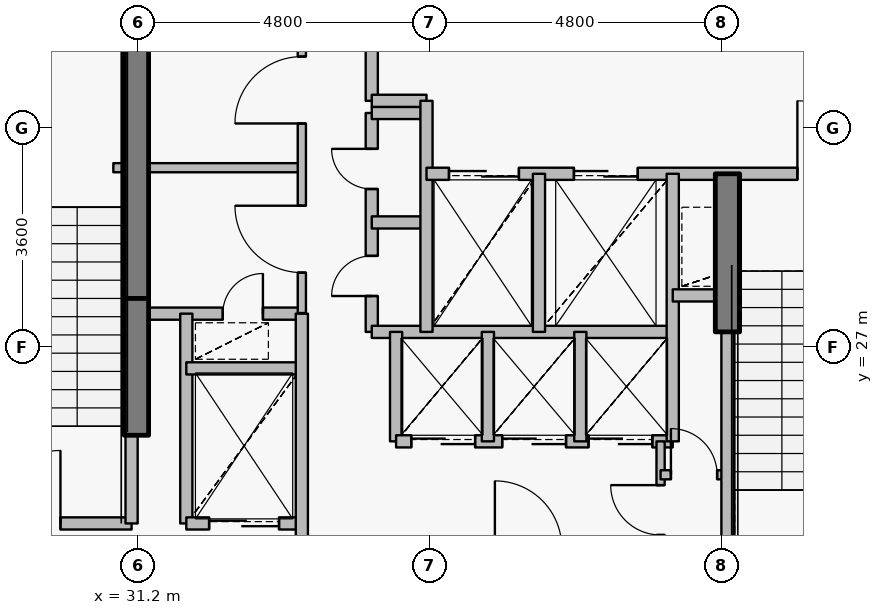
"""IFC4 building model, lengths in metres.
Left out: names, types, materials, properties, quantities, classifications, styles, units other than length and angle.
Written with IfcOpenShell. Run it as: python <this file> out.ifc"""

import sys

from ifc_helpers import new_model, si_unit, direction, frame, frame_2d, origin, origin_2d, place, context, subcontext, project, spatial, rectangle, extrude, source, transform, mapped, element, fill, save


model = new_model("IFC4")
c1 = context("Model", 3, precision=1e-05, world=origin(), true_north=direction((0.0, 1.0)))
c2 = subcontext(c1, "Body", "Model", "MODEL_VIEW")
j1 = project(units=[si_unit("LENGTHUNIT", "METRE"), si_unit("PLANEANGLEUNIT", "RADIAN")], contexts=[c1])
p1 = place(None, origin())
s1 = spatial("IfcSite", under=j1, at=p1, CompositionType="ELEMENT")
p2 = place(p1, origin())
s2 = spatial("IfcBuilding", under=s1, at=p2, CompositionType="ELEMENT")
p3 = place(p2, frame((0.0, 0.0, 335.4)))
s3 = spatial("IfcBuildingStorey", under=s2, at=p3, CompositionType="ELEMENT", Elevation=335.4)
p4 = place(p3, frame((31.18, 27.8, 0.0), z_axis=(0.0, 0.0, 1.0), x_axis=(0.0, 1.0, 0.0)))
e1 = element("IfcWall", 1, at=p4, inside=s3, PredefinedType="SHEAR", context=c2, shape_type="SweptSolid", body=[
    extrude(rectangle(XDim=4.75, YDim=0.4, at=frame_2d((2.375, 0.0))), origin(), (0.0, 0.0, 1.0), 3.8),
])
p5 = place(p3, frame((31.18, 25.55, 0.0), z_axis=(0.0, 0.0, 1.0), x_axis=(0.0, 1.0, 0.0)))
e2 = element("IfcWall", 2, at=p5, inside=s3, PredefinedType="SHEAR", context=c2, shape_type="SweptSolid", body=[
    extrude(rectangle(XDim=2.25, YDim=0.4, at=frame_2d((1.125, 0.0))), origin(), (0.0, 0.0, 1.0), 3.15),
])
p6 = place(p3, frame((40.9, 27.25, 0.0), z_axis=(0.0, 0.0, 1.0), x_axis=(0.0, 1.0, 0.0)))
e3 = element("IfcWall", 3, at=p6, inside=s3, PredefinedType="SHEAR", context=c2, shape_type="SweptSolid", body=[
    extrude(rectangle(XDim=2.6, YDim=0.4, at=frame_2d((1.3, 0.0))), origin(), (0.0, 0.0, 1.0), 3.15),
])
p7 = place(p3, frame((27.56, 24.1, 0.0), z_axis=(0.0, 0.0, 1.0), x_axis=(1.0, 0.0, 0.0)))
e4 = element("IfcWall", 4, at=p7, inside=s3, PredefinedType="PARTITIONING", context=c2, shape_type="SweptSolid", body=[
    extrude(rectangle(XDim=3.54, YDim=0.2, at=frame_2d((1.77, 0.0))), origin(), (0.0, 0.0, 1.0), 3.55),
])
p8 = place(p7, frame((1.17, 0.0, 0.0)))
e5 = element("IfcOpeningElement", 5, at=p8, cuts=e4, PredefinedType="OPENING", context=c2, shape_type="SweptSolid", body=[
    extrude(rectangle(XDim=1.2, YDim=2.15, at=origin_2d()), frame((0.6, 0.11, 1.075), z_axis=(0.0, -1.0, 0.0), x_axis=(1.0, 0.0, 0.0)), (0.0, 0.0, 1.0), 0.22),
])
p9 = place(p3, frame((30.8, 29.95, 0.0), z_axis=(0.0, 0.0, 1.0), x_axis=(1.0, 0.0, 0.0)))
e6 = element("IfcWall", 6, at=p9, inside=s3, PredefinedType="PARTITIONING", context=c2, shape_type="SweptSolid", body=[
    extrude(rectangle(XDim=3.1, YDim=0.15, at=frame_2d((1.55, 0.0))), origin(), (0.0, 0.0, 1.0), 3.135),
])
p10 = place(p3, frame((31.1, 24.1, 0.0), z_axis=(0.0, 0.0, 1.0), x_axis=(0.0, 1.0, 0.0)))
e7 = element("IfcWall", 7, at=p10, inside=s3, PredefinedType="PARTITIONING", context=c2, shape_type="SweptSolid", body=[
    extrude(rectangle(XDim=1.44, YDim=0.2, at=frame_2d((0.72, 0.0))), origin(), (0.0, 0.0, 1.0), 3.55),
])
p11 = place(p3, frame((31.1, 27.55, 0.0), z_axis=(0.0, 0.0, 1.0), x_axis=(1.0, 0.0, 0.0)))
e8 = element("IfcWall", 8, at=p11, inside=s3, PredefinedType="PARTITIONING", context=c2, shape_type="SweptSolid", body=[
    extrude(rectangle(XDim=2.8, YDim=0.2, at=frame_2d((1.4, 0.0))), origin(), (0.0, 0.0, 1.0), 3.135),
])
p12 = place(p11, frame((1.5, 0.0, 0.0)))
e9 = element("IfcOpeningElement", 9, at=p12, cuts=e8, PredefinedType="OPENING", context=c2, shape_type="SweptSolid", body=[
    extrude(rectangle(XDim=0.66, YDim=2.05, at=origin_2d()), frame((0.33, 0.11, 1.025), z_axis=(0.0, -1.0, 0.0), x_axis=(1.0, 0.0, 0.0)), (0.0, 0.0, 1.0), 0.22),
])
p13 = place(p3, frame((32.0, 24.1, 0.0), z_axis=(0.0, 0.0, 1.0), x_axis=(0.0, 1.0, 0.0)))
e10 = element("IfcWall", 10, at=p13, inside=s3, PredefinedType="PARTITIONING", context=c2, shape_type="SweptSolid", body=[
    extrude(rectangle(XDim=3.45, YDim=0.2, at=frame_2d((1.725, 0.0))), origin(), (0.0, 0.0, 1.0), 3.55),
])
p14 = place(p3, frame((32.0, 24.1, 0.0), z_axis=(0.0, 0.0, 1.0), x_axis=(1.0, 0.0, 0.0)))
e11 = element("IfcWall", 11, at=p14, inside=s3, PredefinedType="PARTITIONING", context=c2, shape_type="SweptSolid", body=[
    extrude(rectangle(XDim=1.9, YDim=0.2, at=frame_2d((0.95, 0.0))), origin(), (0.0, 0.0, 1.0), 3.135),
])
p15 = place(p14, frame((0.375, 0.0, 0.0)))
e12 = element("IfcOpeningElement", 12, at=p15, cuts=e11, PredefinedType="OPENING", context=c2, shape_type="SweptSolid", body=[
    extrude(rectangle(XDim=1.15, YDim=2.15, at=origin_2d()), frame((0.575, 0.11, 1.075), z_axis=(0.0, -1.0, 0.0), x_axis=(1.0, 0.0, 0.0)), (0.0, 0.0, 1.0), 0.22),
])
p16 = place(p3, frame((32.0, 26.65, 0.0), z_axis=(0.0, 0.0, 1.0), x_axis=(1.0, 0.0, 0.0)))
e13 = element("IfcWall", 13, at=p16, inside=s3, PredefinedType="PARTITIONING", context=c2, shape_type="SweptSolid", body=[
    extrude(rectangle(XDim=1.9, YDim=0.2, at=frame_2d((0.95, 0.0))), origin(), (0.0, 0.0, 1.0), 3.135),
])
p17 = place(p3, frame((33.9, 20.9, 0.0), z_axis=(0.0, 0.0, 1.0), x_axis=(0.0, 1.0, 0.0)))
e14 = element("IfcWall", 14, at=p17, inside=s3, PredefinedType="PARTITIONING", context=c2, shape_type="SweptSolid", body=[
    extrude(rectangle(XDim=6.65, YDim=0.2, at=frame_2d((3.325, 0.0))), origin(), (0.0, 0.0, 1.0), 3.135),
])
p18 = place(p3, frame((33.9, 27.56, 0.0), z_axis=(0.0, 0.0, 1.0), x_axis=(0.0, 1.0, 0.0)))
e15 = element("IfcWall", 15, at=p18, inside=s3, PredefinedType="PARTITIONING", context=c2, shape_type="SweptSolid", body=[
    extrude(rectangle(XDim=5.54, YDim=0.135, at=frame_2d((2.77, 0.0))), origin(), (0.0, 0.0, 1.0), 3.135),
])
p19 = place(p18, frame((0.665, 0.0, 0.0)))
e16 = element("IfcOpeningElement", 16, at=p19, cuts=e15, PredefinedType="OPENING", context=c2, shape_type="SweptSolid", body=[
    extrude(rectangle(XDim=1.1, YDim=2.15, at=origin_2d()), frame((0.55, 0.078, 1.075), z_axis=(0.0, -1.0, 0.0), x_axis=(1.0, 0.0, 0.0)), (0.0, 0.0, 1.0), 0.155),
])
p20 = place(p18, frame((3.117, 0.0, 0.0)))
e17 = element("IfcOpeningElement", 17, at=p20, cuts=e15, PredefinedType="OPENING", context=c2, shape_type="SweptSolid", body=[
    extrude(rectangle(XDim=1.1, YDim=2.15, at=origin_2d()), frame((0.55, 0.078, 1.075), z_axis=(0.0, -1.0, 0.0), x_axis=(1.0, 0.0, 0.0)), (0.0, 0.0, 1.0), 0.155),
])
p21 = place(p3, frame((35.05, 27.25, 0.0), z_axis=(0.0, 0.0, 1.0), x_axis=(0.0, 1.0, 0.0)))
e18 = element("IfcWall", 18, at=p21, inside=s3, PredefinedType="PARTITIONING", context=c2, shape_type="SweptSolid", body=[
    extrude(rectangle(XDim=3.6, YDim=0.2, at=frame_2d((1.8, 0.0))), origin(), (0.0, 0.0, 1.0), 3.55),
])
p22 = place(p21, frame((0.59, 0.0, 0.0)))
e19 = element("IfcOpeningElement", 19, at=p22, cuts=e18, PredefinedType="OPENING", context=c2, shape_type="SweptSolid", body=[
    extrude(rectangle(XDim=0.66, YDim=2.05, at=origin_2d()), frame((0.33, 0.11, 1.025), z_axis=(0.0, -1.0, 0.0), x_axis=(1.0, 0.0, 0.0)), (0.0, 0.0, 1.0), 0.22),
])
p23 = place(p21, frame((2.35, 0.0, 0.0)))
e20 = element("IfcOpeningElement", 20, at=p23, cuts=e18, PredefinedType="OPENING", context=c2, shape_type="SweptSolid", body=[
    extrude(rectangle(XDim=0.66, YDim=2.05, at=origin_2d()), frame((0.33, 0.11, 1.025), z_axis=(0.0, -1.0, 0.0), x_axis=(1.0, 0.0, 0.0)), (0.0, 0.0, 1.0), 0.22),
])
p24 = place(p3, frame((35.05, 27.25, 0.0), z_axis=(0.0, 0.0, 1.0), x_axis=(1.0, 0.0, 0.0)))
e21 = element("IfcWall", 21, at=p24, inside=s3, PredefinedType="PARTITIONING", context=c2, shape_type="SweptSolid", body=[
    extrude(rectangle(XDim=4.95, YDim=0.2, at=frame_2d((2.475, 0.0))), origin(), (0.0, 0.0, 1.0), 3.135),
])
for number, where, z_axis, x_axis in (
    (22, (35.05, 29.05, 0.0), (0.0, 0.0, 1.0), (1.0, 0.0, 0.0)),
    (23, (35.05, 30.85, 0.0), (0.0, 0.0, 1.0), (1.0, 0.0, 0.0)),
):
    element("IfcWall", number, at=place(p3, frame(where, z_axis=z_axis, x_axis=x_axis)), inside=s3, PredefinedType="PARTITIONING", context=c2, shape_type="SweptSolid", body=[
        extrude(rectangle(XDim=0.9, YDim=0.2, at=frame_2d((0.45, 0.0))), origin(), (0.0, 0.0, 1.0), 3.55),
    ])
p25 = place(p3, frame((35.05, 31.05, 0.0), z_axis=(0.0, 0.0, 1.0), x_axis=(0.0, 1.0, 0.0)))
e24 = element("IfcWall", 24, at=p25, inside=s3, PredefinedType="PARTITIONING", context=c2, shape_type="SweptSolid", body=[
    extrude(rectangle(XDim=2.05, YDim=0.2, at=frame_2d((1.025, 0.0))), origin(), (0.0, 0.0, 1.0), 3.135),
])
p26 = place(p3, frame((35.05, 31.05, 0.0), z_axis=(0.0, 0.0, 1.0), x_axis=(1.0, 0.0, 0.0)))
e25 = element("IfcWall", 25, at=p26, inside=s3, PredefinedType="PARTITIONING", context=c2, shape_type="SweptSolid", body=[
    extrude(rectangle(XDim=0.9, YDim=0.2, at=frame_2d((0.45, 0.0))), origin(), (0.0, 0.0, 1.0), 3.55),
])
p27 = place(p3, frame((35.45, 25.45, 0.0), z_axis=(0.0, 0.0, 1.0), x_axis=(0.0, 1.0, 0.0)))
e26 = element("IfcWall", 26, at=p27, inside=s3, PredefinedType="PARTITIONING", context=c2, shape_type="SweptSolid", body=[
    extrude(rectangle(XDim=1.8, YDim=0.2, at=frame_2d((0.9, 0.0))), origin(), (0.0, 0.0, 1.0), 3.55),
])
p28 = place(p3, frame((35.45, 25.45, 0.0), z_axis=(0.0, 0.0, 1.0), x_axis=(1.0, 0.0, 0.0)))
e27 = element("IfcWall", 27, at=p28, inside=s3, PredefinedType="PARTITIONING", context=c2, shape_type="SweptSolid", body=[
    extrude(rectangle(XDim=4.55, YDim=0.2, at=frame_2d((2.275, 0.0))), origin(), (0.0, 0.0, 1.0), 3.135),
])
p29 = place(p28, frame((0.25, 0.0, 0.0)))
e28 = element("IfcOpeningElement", 28, at=p29, cuts=e27, PredefinedType="OPENING", context=c2, shape_type="SweptSolid", body=[
    extrude(rectangle(XDim=1.05, YDim=2.15, at=origin_2d()), frame((0.525, 0.11, 1.075), z_axis=(0.0, -1.0, 0.0), x_axis=(1.0, 0.0, 0.0)), (0.0, 0.0, 1.0), 0.22),
])
p30 = place(p28, frame((1.745, 0.0, 0.0)))
e29 = element("IfcOpeningElement", 29, at=p30, cuts=e27, PredefinedType="OPENING", context=c2, shape_type="SweptSolid", body=[
    extrude(rectangle(XDim=1.05, YDim=2.15, at=origin_2d()), frame((0.525, 0.11, 1.075), z_axis=(0.0, -1.0, 0.0), x_axis=(1.0, 0.0, 0.0)), (0.0, 0.0, 1.0), 0.22),
])
p31 = place(p28, frame((3.165, 0.0, 0.0)))
e30 = element("IfcOpeningElement", 30, at=p31, cuts=e27, PredefinedType="OPENING", context=c2, shape_type="SweptSolid", body=[
    extrude(rectangle(XDim=1.05, YDim=2.15, at=origin_2d()), frame((0.525, 0.11, 1.075), z_axis=(0.0, -1.0, 0.0), x_axis=(1.0, 0.0, 0.0)), (0.0, 0.0, 1.0), 0.22),
])
p32 = place(p3, frame((35.95, 27.25, 0.0), z_axis=(0.0, 0.0, 1.0), x_axis=(0.0, 1.0, 0.0)))
e31 = element("IfcWall", 31, at=p32, inside=s3, PredefinedType="PARTITIONING", context=c2, shape_type="SweptSolid", body=[
    extrude(rectangle(XDim=3.8, YDim=0.2, at=frame_2d((1.9, 0.0))), origin(), (0.0, 0.0, 1.0), 3.55),
])
p33 = place(p3, frame((35.95, 29.85, 0.0), z_axis=(0.0, 0.0, 1.0), x_axis=(1.0, 0.0, 0.0)))
e32 = element("IfcWall", 32, at=p33, inside=s3, PredefinedType="PARTITIONING", context=c2, shape_type="SweptSolid", body=[
    extrude(rectangle(XDim=8.49, YDim=0.2, at=frame_2d((4.245, 0.0))), origin(), (0.0, 0.0, 1.0), 3.135),
])
p34 = place(p33, frame((6.1, 0.0, 0.0)))
e33 = element("IfcOpeningElement", 33, at=p34, cuts=e32, PredefinedType="OPENING", context=c2, shape_type="SweptSolid", body=[
    extrude(rectangle(XDim=1.2, YDim=2.15, at=origin_2d()), frame((0.6, 0.11, 1.075), z_axis=(0.0, -1.0, 0.0), x_axis=(1.0, 0.0, 0.0)), (0.0, 0.0, 1.0), 0.22),
])
p35 = place(p33, frame((0.37, 0.0, 0.0)))
e34 = element("IfcOpeningElement", 34, at=p35, cuts=e32, PredefinedType="OPENING", context=c2, shape_type="SweptSolid", body=[
    extrude(rectangle(XDim=1.15, YDim=2.15, at=origin_2d()), frame((0.575, 0.11, 1.075), z_axis=(0.0, -1.0, 0.0), x_axis=(1.0, 0.0, 0.0)), (0.0, 0.0, 1.0), 0.22),
])
p36 = place(p33, frame((2.425, 0.0, 0.0)))
e35 = element("IfcOpeningElement", 35, at=p36, cuts=e32, PredefinedType="OPENING", context=c2, shape_type="SweptSolid", body=[
    extrude(rectangle(XDim=1.05, YDim=2.15, at=origin_2d()), frame((0.525, 0.11, 1.075), z_axis=(0.0, -1.0, 0.0), x_axis=(1.0, 0.0, 0.0)), (0.0, 0.0, 1.0), 0.22),
])
p37 = place(p3, frame((36.96, 25.45, 0.0), z_axis=(0.0, 0.0, 1.0), x_axis=(0.0, 1.0, 0.0)))
e36 = element("IfcWall", 36, at=p37, inside=s3, PredefinedType="PARTITIONING", context=c2, shape_type="SweptSolid", body=[
    extrude(rectangle(XDim=1.8, YDim=0.2, at=frame_2d((0.9, 0.0))), origin(), (0.0, 0.0, 1.0), 3.55),
])
p38 = place(p3, frame((37.8, 27.25, 0.0), z_axis=(0.0, 0.0, 1.0), x_axis=(0.0, 1.0, 0.0)))
e37 = element("IfcWall", 37, at=p38, inside=s3, PredefinedType="PARTITIONING", context=c2, shape_type="SweptSolid", body=[
    extrude(rectangle(XDim=2.6, YDim=0.2, at=frame_2d((1.3, 0.0))), origin(), (0.0, 0.0, 1.0), 3.55),
])
p39 = place(p3, frame((38.48, 25.45, 0.0), z_axis=(0.0, 0.0, 1.0), x_axis=(0.0, 1.0, 0.0)))
e38 = element("IfcWall", 38, at=p39, inside=s3, PredefinedType="PARTITIONING", context=c2, shape_type="SweptSolid", body=[
    extrude(rectangle(XDim=1.8, YDim=0.2, at=frame_2d((0.9, 0.0))), origin(), (0.0, 0.0, 1.0), 3.55),
])
p40 = place(p3, frame((39.8, 23.7, 0.0), z_axis=(0.0, 0.0, 1.0), x_axis=(0.0, 1.0, 0.0)))
e39 = element("IfcWall", 39, at=p40, inside=s3, PredefinedType="PARTITIONING", context=c2, shape_type="SweptSolid", body=[
    extrude(rectangle(XDim=1.75, YDim=0.135, at=frame_2d((0.875, 0.0))), origin(), (0.0, 0.0, 1.0), 3.55),
])
p41 = place(p40, frame((0.21, 0.0, 0.0)))
e40 = element("IfcOpeningElement", 40, at=p41, cuts=e39, PredefinedType="OPENING", context=c2, shape_type="SweptSolid", body=[
    extrude(rectangle(XDim=0.82, YDim=2.1, at=origin_2d()), frame((0.41, 0.078, 1.05), z_axis=(0.0, -1.0, 0.0), x_axis=(1.0, 0.0, 0.0)), (0.0, 0.0, 1.0), 0.155),
])
p42 = place(p3, frame((39.8, 24.9, 0.0), z_axis=(0.0, 0.0, 1.0), x_axis=(1.0, 0.0, 0.0)))
e41 = element("IfcWall", 41, at=p42, inside=s3, PredefinedType="PARTITIONING", context=c2, shape_type="SweptSolid", body=[
    extrude(rectangle(XDim=1.1, YDim=0.15, at=frame_2d((0.55, 0.0))), origin(), (0.0, 0.0, 1.0), 3.55),
])
p43 = place(p42, frame((0.17, 0.0, 0.0)))
e42 = element("IfcOpeningElement", 42, at=p43, cuts=e41, PredefinedType="OPENING", context=c2, shape_type="SweptSolid", body=[
    extrude(rectangle(XDim=0.76, YDim=2.1, at=origin_2d()), frame((0.38, 0.085, 1.05), z_axis=(0.0, -1.0, 0.0), x_axis=(1.0, 0.0, 0.0)), (0.0, 0.0, 1.0), 0.17),
])
p44 = place(p3, frame((40.0, 25.45, 0.0), z_axis=(0.0, 0.0, 1.0), x_axis=(0.0, 1.0, 0.0)))
e43 = element("IfcWall", 43, at=p44, inside=s3, PredefinedType="PARTITIONING", context=c2, shape_type="SweptSolid", body=[
    extrude(rectangle(XDim=4.4, YDim=0.2, at=frame_2d((2.2, 0.0))), origin(), (0.0, 0.0, 1.0), 3.55),
])
p45 = place(p3, frame((40.0, 27.85, 0.0), z_axis=(0.0, 0.0, 1.0), x_axis=(1.0, 0.0, 0.0)))
e44 = element("IfcWall", 44, at=p45, inside=s3, PredefinedType="PARTITIONING", context=c2, shape_type="SweptSolid", body=[
    extrude(rectangle(XDim=0.9, YDim=0.2, at=frame_2d((0.45, 0.0))), origin(), (0.0, 0.0, 1.0), 3.55),
])
p46 = place(p3, frame((40.9, 21.33, 0.0), z_axis=(0.0, 0.0, 1.0), x_axis=(0.0, 1.0, 0.0)))
e45 = element("IfcWall", 45, at=p46, inside=s3, PredefinedType="PARTITIONING", context=c2, shape_type="SweptSolid", body=[
    extrude(rectangle(XDim=5.91, YDim=0.2, at=frame_2d((2.955, 0.0))), origin(), (0.0, 0.0, 1.0), 3.085),
])
m1 = source(origin(), c2, "Body", "SweptSolid", [
    extrude(rectangle(XDim=1.2, YDim=2.15, at=origin_2d()), frame((0.6, 0.025, 1.075), z_axis=(0.0, -1.0, 0.0), x_axis=(1.0, 0.0, 0.0)), (0.0, 0.0, 1.0), 0.05),
])
p47 = place(p8, origin())
e46 = element("IfcDoor", 46, at=p47, inside=s3, OperationType="SINGLE_SWING_RIGHT", PredefinedType="DOOR", context=c2, shape_type="MappedRepresentation", body=[
    mapped(m1, transform((0.0, 0.0, 0.0), x_axis=(1.0, 0.0, 0.0), y_axis=(0.0, 1.0, 0.0), z_axis=(0.0, 0.0, 1.0), scale=1.0)),
])
fill(e5, e46)
p48 = place(p34, origin())
e47 = element("IfcDoor", 47, at=p48, inside=s3, OperationType="SINGLE_SWING_LEFT", PredefinedType="DOOR", context=c2, shape_type="MappedRepresentation", body=[
    mapped(m1, transform((0.0, 0.0, 0.0), x_axis=(1.0, 0.0, 0.0), y_axis=(0.0, 1.0, 0.0), z_axis=(0.0, 0.0, 1.0), scale=1.0)),
])
fill(e33, e47)
m2 = source(origin(), c2, "Body", "SweptSolid", [
    extrude(rectangle(XDim=1.15, YDim=2.15, at=origin_2d()), frame((0.575, 0.025, 1.075), z_axis=(0.0, -1.0, 0.0), x_axis=(1.0, 0.0, 0.0)), (0.0, 0.0, 1.0), 0.05),
])
p49 = place(p35, origin())
e48 = element("IfcDoor", 48, at=p49, inside=s3, OperationType="DOUBLE_DOOR_SLIDING", PredefinedType="USERDEFINED", context=c2, shape_type="MappedRepresentation", body=[
    mapped(m2, transform((0.0, 0.0, 0.0), x_axis=(1.0, 0.0, 0.0), y_axis=(0.0, 1.0, 0.0), z_axis=(0.0, 0.0, 1.0), scale=1.0)),
])
fill(e34, e48)
p50 = place(p15, origin())
e49 = element("IfcDoor", 49, at=p50, inside=s3, OperationType="DOUBLE_DOOR_SLIDING", PredefinedType="USERDEFINED", context=c2, shape_type="MappedRepresentation", body=[
    mapped(m2, transform((0.0, 0.0, 0.0), x_axis=(1.0, 0.0, 0.0), y_axis=(0.0, 1.0, 0.0), z_axis=(0.0, 0.0, 1.0), scale=1.0)),
])
fill(e12, e49)
m3 = source(origin(), c2, "Body", "SweptSolid", [
    extrude(rectangle(XDim=1.05, YDim=2.15, at=origin_2d()), frame((0.525, 0.025, 1.075), z_axis=(0.0, -1.0, 0.0), x_axis=(1.0, 0.0, 0.0)), (0.0, 0.0, 1.0), 0.05),
])
p51 = place(p36, origin())
e50 = element("IfcDoor", 50, at=p51, inside=s3, OperationType="DOUBLE_DOOR_SLIDING", PredefinedType="USERDEFINED", context=c2, shape_type="MappedRepresentation", body=[
    mapped(m3, transform((0.0, 0.0, 0.0), x_axis=(1.0, 0.0, 0.0), y_axis=(0.0, 1.0, 0.0), z_axis=(0.0, 0.0, 1.0), scale=1.0)),
])
fill(e35, e50)
p52 = place(p29, origin())
e51 = element("IfcDoor", 51, at=p52, inside=s3, OperationType="DOUBLE_DOOR_SLIDING", PredefinedType="USERDEFINED", context=c2, shape_type="MappedRepresentation", body=[
    mapped(m3, transform((0.0, 0.0, 0.0), x_axis=(1.0, 0.0, 0.0), y_axis=(0.0, 1.0, 0.0), z_axis=(0.0, 0.0, 1.0), scale=1.0)),
])
fill(e28, e51)
p53 = place(p30, origin())
e52 = element("IfcDoor", 52, at=p53, inside=s3, OperationType="DOUBLE_DOOR_SLIDING", PredefinedType="USERDEFINED", context=c2, shape_type="MappedRepresentation", body=[
    mapped(m3, transform((0.0, 0.0, 0.0), x_axis=(1.0, 0.0, 0.0), y_axis=(0.0, 1.0, 0.0), z_axis=(0.0, 0.0, 1.0), scale=1.0)),
])
fill(e29, e52)
p54 = place(p31, origin())
e53 = element("IfcDoor", 53, at=p54, inside=s3, OperationType="DOUBLE_DOOR_SLIDING", PredefinedType="USERDEFINED", context=c2, shape_type="MappedRepresentation", body=[
    mapped(m3, transform((0.0, 0.0, 0.0), x_axis=(1.0, 0.0, 0.0), y_axis=(0.0, 1.0, 0.0), z_axis=(0.0, 0.0, 1.0), scale=1.0)),
])
fill(e30, e53)
m4 = source(origin(), c2, "Body", "SweptSolid", [
    extrude(rectangle(XDim=0.66, YDim=2.05, at=origin_2d()), frame((0.33, 0.025, 1.025), z_axis=(0.0, -1.0, 0.0), x_axis=(1.0, 0.0, 0.0)), (0.0, 0.0, 1.0), 0.05),
])
p55 = place(p22, origin())
e54 = element("IfcDoor", 54, at=p55, inside=s3, OperationType="SINGLE_SWING_LEFT", PredefinedType="USERDEFINED", context=c2, shape_type="MappedRepresentation", body=[
    mapped(m4, transform((0.0, 0.0, 0.0), x_axis=(1.0, 0.0, 0.0), y_axis=(0.0, 1.0, 0.0), z_axis=(0.0, 0.0, 1.0), scale=1.0)),
])
fill(e19, e54)
p56 = place(p23, origin())
e55 = element("IfcDoor", 55, at=p56, inside=s3, OperationType="SINGLE_SWING_RIGHT", PredefinedType="USERDEFINED", context=c2, shape_type="MappedRepresentation", body=[
    mapped(m4, transform((0.0, 0.0, 0.0), x_axis=(1.0, 0.0, 0.0), y_axis=(0.0, 1.0, 0.0), z_axis=(0.0, 0.0, 1.0), scale=1.0)),
])
fill(e20, e55)
m5 = source(origin(), c2, "Body", "SweptSolid", [
    extrude(rectangle(XDim=1.1, YDim=2.15, at=origin_2d()), frame((0.55, 0.025, 1.075), z_axis=(0.0, -1.0, 0.0), x_axis=(1.0, 0.0, 0.0)), (0.0, 0.0, 1.0), 0.05),
])
p57 = place(p19, origin())
e56 = element("IfcDoor", 56, at=p57, inside=s3, OperationType="SINGLE_SWING_RIGHT", PredefinedType="DOOR", context=c2, shape_type="MappedRepresentation", body=[
    mapped(m5, transform((0.0, 0.0, 0.0), x_axis=(1.0, 0.0, 0.0), y_axis=(0.0, 1.0, 0.0), z_axis=(0.0, 0.0, 1.0), scale=1.0)),
])
fill(e16, e56)
p58 = place(p20, origin())
e57 = element("IfcDoor", 57, at=p58, inside=s3, OperationType="SINGLE_SWING_LEFT", PredefinedType="DOOR", context=c2, shape_type="MappedRepresentation", body=[
    mapped(m5, transform((0.0, 0.0, 0.0), x_axis=(1.0, 0.0, 0.0), y_axis=(0.0, 1.0, 0.0), z_axis=(0.0, 0.0, 1.0), scale=1.0)),
])
fill(e17, e57)
m6 = source(origin(), c2, "Body", "SweptSolid", [
    extrude(rectangle(XDim=0.82, YDim=2.1, at=origin_2d()), frame((0.41, 0.025, 1.05), z_axis=(0.0, -1.0, 0.0), x_axis=(1.0, 0.0, 0.0)), (0.0, 0.0, 1.0), 0.05),
])
p59 = place(p41, origin())
e58 = element("IfcDoor", 58, at=p59, inside=s3, OperationType="SINGLE_SWING_RIGHT", PredefinedType="DOOR", context=c2, shape_type="MappedRepresentation", body=[
    mapped(m6, transform((0.0, 0.0, 0.0), x_axis=(1.0, 0.0, 0.0), y_axis=(0.0, 1.0, 0.0), z_axis=(0.0, 0.0, 1.0), scale=1.0)),
])
fill(e40, e58)
m7 = source(origin(), c2, "Body", "SweptSolid", [
    extrude(rectangle(XDim=0.76, YDim=2.1, at=origin_2d()), frame((0.38, 0.025, 1.05), z_axis=(0.0, -1.0, 0.0), x_axis=(1.0, 0.0, 0.0)), (0.0, 0.0, 1.0), 0.05),
])
p60 = place(p43, origin())
e59 = element("IfcDoor", 59, at=p60, inside=s3, OperationType="SINGLE_SWING_LEFT", PredefinedType="DOOR", context=c2, shape_type="MappedRepresentation", body=[
    mapped(m7, transform((0.0, 0.0, 0.0), x_axis=(1.0, 0.0, 0.0), y_axis=(0.0, 1.0, 0.0), z_axis=(0.0, 0.0, 1.0), scale=1.0)),
])
fill(e42, e59)
p61 = place(p12, origin())
e60 = element("IfcDoor", 60, at=p61, inside=s3, OperationType="SINGLE_SWING_RIGHT", PredefinedType="USERDEFINED", context=c2, shape_type="MappedRepresentation", body=[
    mapped(m4, transform((0.0, 0.0, 0.0), x_axis=(1.0, 0.0, 0.0), y_axis=(0.0, 1.0, 0.0), z_axis=(0.0, 0.0, 1.0), scale=1.0)),
])
fill(e9, e60)
save(model, sys.argv[1])
